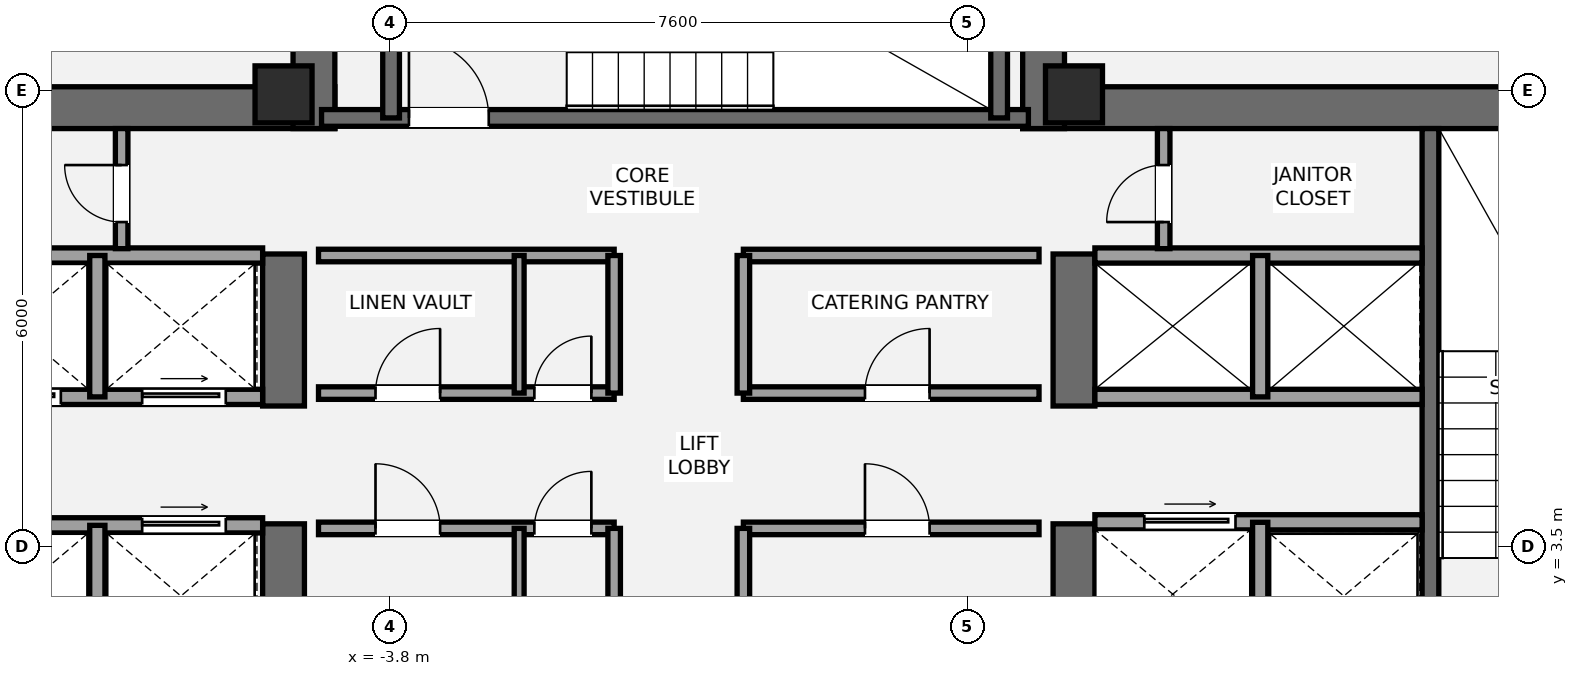
"""IFC4 building model, lengths in metres.
Left out: names, types, materials, properties, quantities, classifications, styles, units other than length and angle.
Written with IfcOpenShell. Run it as: python <this file> out.ifc"""

import sys

from ifc_helpers import new_model, si_unit, direction, frame, frame_2d, origin, origin_2d, place, context, subcontext, project, spatial, rectangle, extrude, element, fill, save


model = new_model("IFC4")
c1 = context("Model", 3, precision=1e-05, world=origin(), true_north=direction((0.0, 1.0)))
c2 = subcontext(c1, "Body", "Model", "MODEL_VIEW")
j1 = project(units=[si_unit("LENGTHUNIT", "METRE"), si_unit("PLANEANGLEUNIT", "RADIAN")], contexts=[c1])
p1 = place(None, origin())
s1 = spatial("IfcSite", under=j1, at=p1, CompositionType="ELEMENT")
p2 = place(p1, origin())
s2 = spatial("IfcBuilding", under=s1, at=p2, CompositionType="ELEMENT")
p3 = place(p2, frame((0.0, 0.0, 213.15)))
s3 = spatial("IfcBuildingStorey", under=s2, at=p3, CompositionType="ELEMENT", Elevation=213.15)
p4 = place(p3, frame((-13.7, 9.275, 0.0), z_axis=(0.0, 0.0, 1.0), x_axis=(1.0, 0.0, 0.0)))
e1 = element("IfcWall", 1, at=p4, inside=s3, PredefinedType="SHEAR", context=c2, shape_type="SweptSolid", body=[
    extrude(rectangle(XDim=9.175, YDim=0.55, at=frame_2d((4.587, 0.0))), origin(), (0.0, 0.0, 1.0), 3.15),
])
p5 = place(p3, frame((-5.2, 1.3, 0.0), z_axis=(0.0, 0.0, 1.0), x_axis=(0.0, 1.0, 0.0)))
e2 = element("IfcWall", 2, at=p5, inside=s3, PredefinedType="SHEAR", context=c2, shape_type="SweptSolid", body=[
    extrude(rectangle(XDim=2.5, YDim=0.55, at=frame_2d((1.25, 0.0))), origin(), (0.0, 0.0, 1.0), 3.15),
])
p6 = place(p3, frame((-5.2, 5.35, 0.0), z_axis=(0.0, 0.0, 1.0), x_axis=(0.0, 1.0, 0.0)))
e3 = element("IfcWall", 3, at=p6, inside=s3, PredefinedType="SHEAR", context=c2, shape_type="SweptSolid", body=[
    extrude(rectangle(XDim=2.0, YDim=0.55, at=frame_2d((1.0, 0.0))), origin(), (0.0, 0.0, 1.0), 3.15),
])
p7 = place(p3, frame((4.525, 9.275, 0.0), z_axis=(0.0, 0.0, 1.0), x_axis=(1.0, 0.0, 0.0)))
e4 = element("IfcWall", 4, at=p7, inside=s3, PredefinedType="SHEAR", context=c2, shape_type="SweptSolid", body=[
    extrude(rectangle(XDim=9.175, YDim=0.55, at=frame_2d((4.587, 0.0))), origin(), (0.0, 0.0, 1.0), 3.15),
])
p8 = place(p3, frame((5.2, 1.3, 0.0), z_axis=(0.0, 0.0, 1.0), x_axis=(0.0, 1.0, 0.0)))
e5 = element("IfcWall", 5, at=p8, inside=s3, PredefinedType="SHEAR", context=c2, shape_type="SweptSolid", body=[
    extrude(rectangle(XDim=2.5, YDim=0.55, at=frame_2d((1.25, 0.0))), origin(), (0.0, 0.0, 1.0), 3.15),
])
p9 = place(p3, frame((5.2, 5.35, 0.0), z_axis=(0.0, 0.0, 1.0), x_axis=(0.0, 1.0, 0.0)))
e6 = element("IfcWall", 6, at=p9, inside=s3, PredefinedType="SHEAR", context=c2, shape_type="SweptSolid", body=[
    extrude(rectangle(XDim=2.0, YDim=0.55, at=frame_2d((1.0, 0.0))), origin(), (0.0, 0.0, 1.0), 3.15),
])
p10 = place(p3, frame((9.89, 1.85, 0.0), z_axis=(0.0, 0.0, 1.0), x_axis=(0.0, 1.0, 0.0)))
e7 = element("IfcWall", 7, at=p10, inside=s3, PredefinedType="SHEAR", context=c2, shape_type="SweptSolid", body=[
    extrude(rectangle(XDim=7.15, YDim=0.22, at=frame_2d((3.575, 0.0))), origin(), (0.0, 0.0, 1.0), 3.15),
])
for number, where, z_axis, x_axis in (
    (8, (-4.8, 9.0, 0.0), (0.0, 0.0, 1.0), (0.0, 1.0, 0.0)),
    (9, (4.8, 9.0, 0.0), (0.0, 0.0, 1.0), (0.0, 1.0, 0.0)),
):
    element("IfcWall", number, at=place(p3, frame(where, z_axis=z_axis, x_axis=x_axis)), inside=s3, PredefinedType="SHEAR", context=c2, shape_type="SweptSolid", body=[
        extrude(rectangle(XDim=3.95, YDim=0.55, at=frame_2d((1.975, 0.0))), origin(), (0.0, 0.0, 1.0), 3.15),
    ])
p11 = place(p3, frame((-4.7, 9.14, 0.0), z_axis=(0.0, 0.0, 1.0), x_axis=(1.0, 0.0, 0.0)))
e10 = element("IfcWall", 10, at=p11, inside=s3, PredefinedType="SHEAR", context=c2, shape_type="SweptSolid", body=[
    extrude(rectangle(XDim=9.3, YDim=0.22, at=frame_2d((4.65, 0.0))), origin(), (0.0, 0.0, 1.0), 3.15),
])
p12 = place(p11, frame((1.15, 0.0, 0.0)))
e11 = element("IfcOpeningElement", 11, at=p12, cuts=e10, PredefinedType="OPENING", context=c2, shape_type="SweptSolid", body=[
    extrude(rectangle(XDim=1.05, YDim=2.15, at=frame_2d((0.525, 1.075))), frame((0.0, 0.12, 0.0), z_axis=(0.0, -1.0, 0.0), x_axis=(1.0, 0.0, 0.0)), (0.0, 0.0, 1.0), 0.24),
])
for number, where, z_axis, x_axis in (
    (12, (-3.785, 9.14, 0.0), (0.0, 0.0, 1.0), (0.0, 1.0, 0.0)),
    (13, (4.215, 9.14, 0.0), (0.0, 0.0, 1.0), (0.0, 1.0, 0.0)),
):
    element("IfcWall", number, at=place(p3, frame(where, z_axis=z_axis, x_axis=x_axis)), inside=s3, PredefinedType="SHEAR", context=c2, shape_type="SweptSolid", body=[
        extrude(rectangle(XDim=3.26, YDim=0.22, at=frame_2d((1.63, 0.0))), origin(), (0.0, 0.0, 1.0), 3.15),
    ])
for number, where, z_axis, x_axis in (
    (14, (-5.2, 9.45, 0.0), (0.0, 0.0, 1.0), (1.0, 0.0, 0.0)),
    (15, (5.2, 9.45, 0.0), (0.0, 0.0, 1.0), (1.0, 0.0, 0.0)),
):
    element("IfcColumn", number, at=place(p3, frame(where, z_axis=z_axis, x_axis=x_axis)), inside=s3, PredefinedType="PILASTER", context=c2, shape_type="SweptSolid", body=[
        extrude(rectangle(XDim=0.75, YDim=0.75, at=origin_2d()), origin(), (0.0, 0.0, 1.0), 3.15),
    ])
p13 = place(p3, frame((-9.78, 3.78, 0.0), z_axis=(0.0, 0.0, 1.0), x_axis=(1.0, 0.0, 0.0)))
e16 = element("IfcWall", 16, at=p13, inside=s3, PredefinedType="SOLIDWALL", context=c2, shape_type="SweptSolid", body=[
    extrude(rectangle(XDim=4.305, YDim=0.2, at=frame_2d((2.152, 0.0))), origin(), (0.0, 0.0, 1.0), 2.97),
])
p14 = place(p13, frame((2.72, 0.0, 0.0)))
e17 = element("IfcOpeningElement", 17, at=p14, cuts=e16, PredefinedType="OPENING", context=c2, shape_type="SweptSolid", body=[
    extrude(rectangle(XDim=1.1, YDim=2.2, at=frame_2d((0.55, 1.1))), frame((0.0, 0.11, 0.0), z_axis=(0.0, -1.0, 0.0), x_axis=(1.0, 0.0, 0.0)), (0.0, 0.0, 1.0), 0.22),
])
p15 = place(p3, frame((-7.65, 1.85, 0.0), z_axis=(0.0, 0.0, 1.0), x_axis=(0.0, 1.0, 0.0)))
e18 = element("IfcWall", 18, at=p15, inside=s3, PredefinedType="SOLIDWALL", context=c2, shape_type="SweptSolid", body=[
    extrude(rectangle(XDim=1.93, YDim=0.2, at=frame_2d((0.965, 0.0))), origin(), (0.0, 0.0, 1.0), 2.97),
])
p16 = place(p3, frame((-9.78, 5.47, 0.0), z_axis=(0.0, 0.0, 1.0), x_axis=(1.0, 0.0, 0.0)))
e19 = element("IfcWall", 19, at=p16, inside=s3, PredefinedType="SOLIDWALL", context=c2, shape_type="SweptSolid", body=[
    extrude(rectangle(XDim=4.305, YDim=0.2, at=frame_2d((2.152, 0.0))), origin(), (0.0, 0.0, 1.0), 2.97),
])
p17 = place(p16, frame((0.55, 0.0, 0.0)))
e20 = element("IfcOpeningElement", 20, at=p17, cuts=e19, PredefinedType="OPENING", context=c2, shape_type="SweptSolid", body=[
    extrude(rectangle(XDim=1.1, YDim=2.2, at=frame_2d((0.55, 1.1))), frame((0.0, 0.11, 0.0), z_axis=(0.0, -1.0, 0.0), x_axis=(1.0, 0.0, 0.0)), (0.0, 0.0, 1.0), 0.22),
])
p18 = place(p16, frame((2.72, 0.0, 0.0)))
e21 = element("IfcOpeningElement", 21, at=p18, cuts=e19, PredefinedType="OPENING", context=c2, shape_type="SweptSolid", body=[
    extrude(rectangle(XDim=1.1, YDim=2.2, at=frame_2d((0.55, 1.1))), frame((0.0, 0.11, 0.0), z_axis=(0.0, -1.0, 0.0), x_axis=(1.0, 0.0, 0.0)), (0.0, 0.0, 1.0), 0.22),
])
p19 = place(p3, frame((-9.78, 7.33, 0.0), z_axis=(0.0, 0.0, 1.0), x_axis=(1.0, 0.0, 0.0)))
e22 = element("IfcWall", 22, at=p19, inside=s3, PredefinedType="SOLIDWALL", context=c2, shape_type="SweptSolid", body=[
    extrude(rectangle(XDim=4.305, YDim=0.2, at=frame_2d((2.152, 0.0))), origin(), (0.0, 0.0, 1.0), 2.97),
])
p20 = place(p3, frame((-7.65, 5.47, 0.0), z_axis=(0.0, 0.0, 1.0), x_axis=(0.0, 1.0, 0.0)))
e23 = element("IfcWall", 23, at=p20, inside=s3, PredefinedType="SOLIDWALL", context=c2, shape_type="SweptSolid", body=[
    extrude(rectangle(XDim=1.86, YDim=0.2, at=frame_2d((0.93, 0.0))), origin(), (0.0, 0.0, 1.0), 2.97),
])
p21 = place(p3, frame((5.475, 3.82, 0.0), z_axis=(0.0, 0.0, 1.0), x_axis=(1.0, 0.0, 0.0)))
e24 = element("IfcWall", 24, at=p21, inside=s3, PredefinedType="SOLIDWALL", context=c2, shape_type="SweptSolid", body=[
    extrude(rectangle(XDim=4.305, YDim=0.2, at=frame_2d((2.152, 0.0))), origin(), (0.0, 0.0, 1.0), 2.97),
])
p22 = place(p21, frame((0.65, 0.0, 0.0)))
e25 = element("IfcOpeningElement", 25, at=p22, cuts=e24, PredefinedType="OPENING", context=c2, shape_type="SweptSolid", body=[
    extrude(rectangle(XDim=1.2, YDim=2.2, at=frame_2d((0.6, 1.1))), frame((0.0, 0.11, 0.0), z_axis=(0.0, -1.0, 0.0), x_axis=(1.0, 0.0, 0.0)), (0.0, 0.0, 1.0), 0.22),
])
p23 = place(p3, frame((7.65, 1.85, 0.0), z_axis=(0.0, 0.0, 1.0), x_axis=(0.0, 1.0, 0.0)))
e26 = element("IfcWall", 26, at=p23, inside=s3, PredefinedType="SOLIDWALL", context=c2, shape_type="SweptSolid", body=[
    extrude(rectangle(XDim=1.97, YDim=0.2, at=frame_2d((0.985, 0.0))), origin(), (0.0, 0.0, 1.0), 2.97),
])
for number, where, z_axis, x_axis in (
    (27, (5.475, 5.47, 0.0), (0.0, 0.0, 1.0), (1.0, 0.0, 0.0)),
    (28, (5.475, 7.33, 0.0), (0.0, 0.0, 1.0), (1.0, 0.0, 0.0)),
):
    element("IfcWall", number, at=place(p3, frame(where, z_axis=z_axis, x_axis=x_axis)), inside=s3, PredefinedType="SOLIDWALL", context=c2, shape_type="SweptSolid", body=[
        extrude(rectangle(XDim=4.305, YDim=0.2, at=frame_2d((2.152, 0.0))), origin(), (0.0, 0.0, 1.0), 2.97),
    ])
p24 = place(p3, frame((7.65, 5.47, 0.0), z_axis=(0.0, 0.0, 1.0), x_axis=(0.0, 1.0, 0.0)))
e29 = element("IfcWall", 29, at=p24, inside=s3, PredefinedType="SOLIDWALL", context=c2, shape_type="SweptSolid", body=[
    extrude(rectangle(XDim=1.86, YDim=0.2, at=frame_2d((0.93, 0.0))), origin(), (0.0, 0.0, 1.0), 2.97),
])
p25 = place(p3, frame((-4.74, 3.74, 0.0), z_axis=(0.0, 0.0, 1.0), x_axis=(1.0, 0.0, 0.0)))
e30 = element("IfcWall", 30, at=p25, inside=s3, PredefinedType="PARTITIONING", context=c2, shape_type="SweptSolid", body=[
    extrude(rectangle(XDim=3.89, YDim=0.165, at=frame_2d((1.945, 0.0))), origin(), (0.0, 0.0, 1.0), 2.97),
])
p26 = place(p25, frame((0.75, 0.0, 0.0)))
e31 = element("IfcOpeningElement", 31, at=p26, cuts=e30, PredefinedType="OPENING", context=c2, shape_type="SweptSolid", body=[
    extrude(rectangle(XDim=0.85, YDim=2.1, at=frame_2d((0.425, 1.05))), frame((0.0, 0.093, 0.0), z_axis=(0.0, -1.0, 0.0), x_axis=(1.0, 0.0, 0.0)), (0.0, 0.0, 1.0), 0.185),
])
p27 = place(p25, frame((2.84, 0.0, 0.0)))
e32 = element("IfcOpeningElement", 32, at=p27, cuts=e30, PredefinedType="OPENING", context=c2, shape_type="SweptSolid", body=[
    extrude(rectangle(XDim=0.75, YDim=2.1, at=frame_2d((0.375, 1.05))), frame((0.0, 0.093, 0.0), z_axis=(0.0, -1.0, 0.0), x_axis=(1.0, 0.0, 0.0)), (0.0, 0.0, 1.0), 0.185),
])
p28 = place(p3, frame((-0.85, 1.92, 0.0), z_axis=(0.0, 0.0, 1.0), x_axis=(0.0, 1.0, 0.0)))
e33 = element("IfcWall", 33, at=p28, inside=s3, PredefinedType="PARTITIONING", context=c2, shape_type="SweptSolid", body=[
    extrude(rectangle(XDim=1.82, YDim=0.165, at=frame_2d((0.91, 0.0))), origin(), (0.0, 0.0, 1.0), 2.97),
])
p29 = place(p3, frame((0.85, 3.74, 0.0), z_axis=(0.0, 0.0, 1.0), x_axis=(1.0, 0.0, 0.0)))
e34 = element("IfcWall", 34, at=p29, inside=s3, PredefinedType="PARTITIONING", context=c2, shape_type="SweptSolid", body=[
    extrude(rectangle(XDim=3.89, YDim=0.165, at=frame_2d((1.945, 0.0))), origin(), (0.0, 0.0, 1.0), 2.97),
])
p30 = place(p29, frame((1.6, 0.0, 0.0)))
e35 = element("IfcOpeningElement", 35, at=p30, cuts=e34, PredefinedType="OPENING", context=c2, shape_type="SweptSolid", body=[
    extrude(rectangle(XDim=0.85, YDim=2.1, at=frame_2d((0.425, 1.05))), frame((0.0, 0.093, 0.0), z_axis=(0.0, -1.0, 0.0), x_axis=(1.0, 0.0, 0.0)), (0.0, 0.0, 1.0), 0.185),
])
p31 = place(p3, frame((0.85, 1.92, 0.0), z_axis=(0.0, 0.0, 1.0), x_axis=(0.0, 1.0, 0.0)))
e36 = element("IfcWall", 36, at=p31, inside=s3, PredefinedType="PARTITIONING", context=c2, shape_type="SweptSolid", body=[
    extrude(rectangle(XDim=1.82, YDim=0.165, at=frame_2d((0.91, 0.0))), origin(), (0.0, 0.0, 1.0), 2.97),
])
p32 = place(p3, frame((-2.1, 1.92, 0.0), z_axis=(0.0, 0.0, 1.0), x_axis=(0.0, 1.0, 0.0)))
e37 = element("IfcWall", 37, at=p32, inside=s3, PredefinedType="PARTITIONING", context=c2, shape_type="SweptSolid", body=[
    extrude(rectangle(XDim=1.82, YDim=0.13, at=frame_2d((0.91, 0.0))), origin(), (0.0, 0.0, 1.0), 2.97),
])
p33 = place(p3, frame((-4.74, 5.52, 0.0), z_axis=(0.0, 0.0, 1.0), x_axis=(1.0, 0.0, 0.0)))
e38 = element("IfcWall", 38, at=p33, inside=s3, PredefinedType="PARTITIONING", context=c2, shape_type="SweptSolid", body=[
    extrude(rectangle(XDim=3.89, YDim=0.165, at=frame_2d((1.945, 0.0))), origin(), (0.0, 0.0, 1.0), 2.97),
])
p34 = place(p33, frame((0.75, 0.0, 0.0)))
e39 = element("IfcOpeningElement", 39, at=p34, cuts=e38, PredefinedType="OPENING", context=c2, shape_type="SweptSolid", body=[
    extrude(rectangle(XDim=0.85, YDim=2.1, at=frame_2d((0.425, 1.05))), frame((0.0, 0.093, 0.0), z_axis=(0.0, -1.0, 0.0), x_axis=(1.0, 0.0, 0.0)), (0.0, 0.0, 1.0), 0.185),
])
p35 = place(p33, frame((2.84, 0.0, 0.0)))
e40 = element("IfcOpeningElement", 40, at=p35, cuts=e38, PredefinedType="OPENING", context=c2, shape_type="SweptSolid", body=[
    extrude(rectangle(XDim=0.75, YDim=2.1, at=frame_2d((0.375, 1.05))), frame((0.0, 0.093, 0.0), z_axis=(0.0, -1.0, 0.0), x_axis=(1.0, 0.0, 0.0)), (0.0, 0.0, 1.0), 0.185),
])
p36 = place(p3, frame((-4.74, 7.33, 0.0), z_axis=(0.0, 0.0, 1.0), x_axis=(1.0, 0.0, 0.0)))
e41 = element("IfcWall", 41, at=p36, inside=s3, PredefinedType="PARTITIONING", context=c2, shape_type="SweptSolid", body=[
    extrude(rectangle(XDim=3.89, YDim=0.165, at=frame_2d((1.945, 0.0))), origin(), (0.0, 0.0, 1.0), 2.97),
])
p37 = place(p3, frame((-0.85, 5.52, 0.0), z_axis=(0.0, 0.0, 1.0), x_axis=(0.0, 1.0, 0.0)))
e42 = element("IfcWall", 42, at=p37, inside=s3, PredefinedType="PARTITIONING", context=c2, shape_type="SweptSolid", body=[
    extrude(rectangle(XDim=1.81, YDim=0.165, at=frame_2d((0.905, 0.0))), origin(), (0.0, 0.0, 1.0), 2.97),
])
p38 = place(p3, frame((0.85, 5.52, 0.0), z_axis=(0.0, 0.0, 1.0), x_axis=(1.0, 0.0, 0.0)))
e43 = element("IfcWall", 43, at=p38, inside=s3, PredefinedType="PARTITIONING", context=c2, shape_type="SweptSolid", body=[
    extrude(rectangle(XDim=3.89, YDim=0.165, at=frame_2d((1.945, 0.0))), origin(), (0.0, 0.0, 1.0), 2.97),
])
p39 = place(p38, frame((1.6, 0.0, 0.0)))
e44 = element("IfcOpeningElement", 44, at=p39, cuts=e43, PredefinedType="OPENING", context=c2, shape_type="SweptSolid", body=[
    extrude(rectangle(XDim=0.85, YDim=2.1, at=frame_2d((0.425, 1.05))), frame((0.0, 0.093, 0.0), z_axis=(0.0, -1.0, 0.0), x_axis=(1.0, 0.0, 0.0)), (0.0, 0.0, 1.0), 0.185),
])
p40 = place(p3, frame((0.85, 7.33, 0.0), z_axis=(0.0, 0.0, 1.0), x_axis=(1.0, 0.0, 0.0)))
e45 = element("IfcWall", 45, at=p40, inside=s3, PredefinedType="PARTITIONING", context=c2, shape_type="SweptSolid", body=[
    extrude(rectangle(XDim=3.89, YDim=0.165, at=frame_2d((1.945, 0.0))), origin(), (0.0, 0.0, 1.0), 2.97),
])
p41 = place(p3, frame((0.85, 5.52, 0.0), z_axis=(0.0, 0.0, 1.0), x_axis=(0.0, 1.0, 0.0)))
e46 = element("IfcWall", 46, at=p41, inside=s3, PredefinedType="PARTITIONING", context=c2, shape_type="SweptSolid", body=[
    extrude(rectangle(XDim=1.81, YDim=0.165, at=frame_2d((0.905, 0.0))), origin(), (0.0, 0.0, 1.0), 2.97),
])
p42 = place(p3, frame((-2.1, 5.52, 0.0), z_axis=(0.0, 0.0, 1.0), x_axis=(0.0, 1.0, 0.0)))
e47 = element("IfcWall", 47, at=p42, inside=s3, PredefinedType="PARTITIONING", context=c2, shape_type="SweptSolid", body=[
    extrude(rectangle(XDim=1.81, YDim=0.13, at=frame_2d((0.905, 0.0))), origin(), (0.0, 0.0, 1.0), 2.97),
])
p43 = place(p3, frame((-7.33, 7.42, 0.0), z_axis=(0.0, 0.0, 1.0), x_axis=(0.0, 1.0, 0.0)))
e48 = element("IfcWall", 48, at=p43, inside=s3, PredefinedType="PARTITIONING", context=c2, shape_type="SweptSolid", body=[
    extrude(rectangle(XDim=1.58, YDim=0.165, at=frame_2d((0.79, 0.0))), origin(), (0.0, 0.0, 1.0), 2.97),
])
p44 = place(p43, frame((0.35, 0.0, 0.0)))
e49 = element("IfcOpeningElement", 49, at=p44, cuts=e48, PredefinedType="OPENING", context=c2, shape_type="SweptSolid", body=[
    extrude(rectangle(XDim=0.75, YDim=2.1, at=frame_2d((0.375, 1.05))), frame((0.0, 0.093, 0.0), z_axis=(0.0, -1.0, 0.0), x_axis=(1.0, 0.0, 0.0)), (0.0, 0.0, 1.0), 0.185),
])
p45 = place(p3, frame((6.38, 7.42, 0.0), z_axis=(0.0, 0.0, 1.0), x_axis=(0.0, 1.0, 0.0)))
e50 = element("IfcWall", 50, at=p45, inside=s3, PredefinedType="PARTITIONING", context=c2, shape_type="SweptSolid", body=[
    extrude(rectangle(XDim=1.58, YDim=0.165, at=frame_2d((0.79, 0.0))), origin(), (0.0, 0.0, 1.0), 2.97),
])
p46 = place(p45, frame((0.35, 0.0, 0.0)))
e51 = element("IfcOpeningElement", 51, at=p46, cuts=e50, PredefinedType="OPENING", context=c2, shape_type="SweptSolid", body=[
    extrude(rectangle(XDim=0.75, YDim=2.1, at=frame_2d((0.375, 1.05))), frame((0.0, 0.093, 0.0), z_axis=(0.0, -1.0, 0.0), x_axis=(1.0, 0.0, 0.0)), (0.0, 0.0, 1.0), 0.185),
])
p47 = place(p12, origin())
e52 = element("IfcDoor", 52, at=p47, inside=s3, OperationType="SINGLE_SWING_LEFT", PredefinedType="DOOR", context=c2, shape_type="SweptSolid", body=[
    extrude(rectangle(XDim=1.05, YDim=2.15, at=frame_2d((0.525, 1.075))), frame((0.0, 0.025, 0.0), z_axis=(0.0, -1.0, 0.0), x_axis=(1.0, 0.0, 0.0)), (0.0, 0.0, 1.0), 0.05),
])
fill(e11, e52)
p48 = place(p17, origin())
e53 = element("IfcDoor", 53, at=p48, inside=s3, OperationType="SLIDING_TO_LEFT", PredefinedType="DOOR", context=c2, shape_type="SweptSolid", body=[
    extrude(rectangle(XDim=1.1, YDim=2.2, at=frame_2d((0.55, 1.1))), frame((0.0, 0.025, 0.0), z_axis=(0.0, -1.0, 0.0), x_axis=(1.0, 0.0, 0.0)), (0.0, 0.0, 1.0), 0.05),
])
fill(e20, e53)
p49 = place(p18, origin())
e54 = element("IfcDoor", 54, at=p49, inside=s3, OperationType="SLIDING_TO_LEFT", PredefinedType="DOOR", context=c2, shape_type="SweptSolid", body=[
    extrude(rectangle(XDim=1.1, YDim=2.2, at=frame_2d((0.55, 1.1))), frame((0.0, 0.025, 0.0), z_axis=(0.0, -1.0, 0.0), x_axis=(1.0, 0.0, 0.0)), (0.0, 0.0, 1.0), 0.05),
])
fill(e21, e54)
p50 = place(p14, origin())
e55 = element("IfcDoor", 55, at=p50, inside=s3, OperationType="SLIDING_TO_LEFT", PredefinedType="DOOR", context=c2, shape_type="SweptSolid", body=[
    extrude(rectangle(XDim=1.1, YDim=2.2, at=frame_2d((0.55, 1.1))), frame((0.0, 0.025, 0.0), z_axis=(0.0, -1.0, 0.0), x_axis=(1.0, 0.0, 0.0)), (0.0, 0.0, 1.0), 0.05),
])
fill(e17, e55)
p51 = place(p22, origin())
e56 = element("IfcDoor", 56, at=p51, inside=s3, OperationType="SLIDING_TO_RIGHT", PredefinedType="DOOR", context=c2, shape_type="SweptSolid", body=[
    extrude(rectangle(XDim=1.2, YDim=2.2, at=frame_2d((0.6, 1.1))), frame((0.0, 0.025, 0.0), z_axis=(0.0, -1.0, 0.0), x_axis=(1.0, 0.0, 0.0)), (0.0, 0.0, 1.0), 0.05),
])
fill(e25, e56)
p52 = place(p26, origin())
e57 = element("IfcDoor", 57, at=p52, inside=s3, OperationType="SINGLE_SWING_LEFT", PredefinedType="DOOR", context=c2, shape_type="SweptSolid", body=[
    extrude(rectangle(XDim=0.85, YDim=2.1, at=frame_2d((0.425, 1.05))), frame((0.0, 0.025, 0.0), z_axis=(0.0, -1.0, 0.0), x_axis=(1.0, 0.0, 0.0)), (0.0, 0.0, 1.0), 0.05),
])
fill(e31, e57)
p53 = place(p27, origin())
e58 = element("IfcDoor", 58, at=p53, inside=s3, OperationType="SINGLE_SWING_RIGHT", PredefinedType="DOOR", context=c2, shape_type="SweptSolid", body=[
    extrude(rectangle(XDim=0.75, YDim=2.1, at=frame_2d((0.375, 1.05))), frame((0.0, 0.025, 0.0), z_axis=(0.0, -1.0, 0.0), x_axis=(1.0, 0.0, 0.0)), (0.0, 0.0, 1.0), 0.05),
])
fill(e32, e58)
p54 = place(p30, origin())
e59 = element("IfcDoor", 59, at=p54, inside=s3, OperationType="SINGLE_SWING_LEFT", PredefinedType="DOOR", context=c2, shape_type="SweptSolid", body=[
    extrude(rectangle(XDim=0.85, YDim=2.1, at=frame_2d((0.425, 1.05))), frame((0.0, 0.025, 0.0), z_axis=(0.0, -1.0, 0.0), x_axis=(1.0, 0.0, 0.0)), (0.0, 0.0, 1.0), 0.05),
])
fill(e35, e59)
p55 = place(p34, origin())
e60 = element("IfcDoor", 60, at=p55, inside=s3, OperationType="SINGLE_SWING_RIGHT", PredefinedType="DOOR", context=c2, shape_type="SweptSolid", body=[
    extrude(rectangle(XDim=0.85, YDim=2.1, at=frame_2d((0.425, 1.05))), frame((0.0, 0.025, 0.0), z_axis=(0.0, -1.0, 0.0), x_axis=(1.0, 0.0, 0.0)), (0.0, 0.0, 1.0), 0.05),
])
fill(e39, e60)
p56 = place(p35, origin())
e61 = element("IfcDoor", 61, at=p56, inside=s3, OperationType="SINGLE_SWING_RIGHT", PredefinedType="DOOR", context=c2, shape_type="SweptSolid", body=[
    extrude(rectangle(XDim=0.75, YDim=2.1, at=frame_2d((0.375, 1.05))), frame((0.0, 0.025, 0.0), z_axis=(0.0, -1.0, 0.0), x_axis=(1.0, 0.0, 0.0)), (0.0, 0.0, 1.0), 0.05),
])
fill(e40, e61)
p57 = place(p39, origin())
e62 = element("IfcDoor", 62, at=p57, inside=s3, OperationType="SINGLE_SWING_RIGHT", PredefinedType="DOOR", context=c2, shape_type="SweptSolid", body=[
    extrude(rectangle(XDim=0.85, YDim=2.1, at=frame_2d((0.425, 1.05))), frame((0.0, 0.025, 0.0), z_axis=(0.0, -1.0, 0.0), x_axis=(1.0, 0.0, 0.0)), (0.0, 0.0, 1.0), 0.05),
])
fill(e44, e62)
p58 = place(p44, origin())
e63 = element("IfcDoor", 63, at=p58, inside=s3, OperationType="SINGLE_SWING_RIGHT", PredefinedType="DOOR", context=c2, shape_type="SweptSolid", body=[
    extrude(rectangle(XDim=0.75, YDim=2.1, at=frame_2d((0.375, 1.05))), frame((0.0, 0.025, 0.0), z_axis=(0.0, -1.0, 0.0), x_axis=(1.0, 0.0, 0.0)), (0.0, 0.0, 1.0), 0.05),
])
fill(e49, e63)
p59 = place(p46, origin())
e64 = element("IfcDoor", 64, at=p59, inside=s3, OperationType="SINGLE_SWING_LEFT", PredefinedType="DOOR", context=c2, shape_type="SweptSolid", body=[
    extrude(rectangle(XDim=0.75, YDim=2.1, at=frame_2d((0.375, 1.05))), frame((0.0, 0.025, 0.0), z_axis=(0.0, -1.0, 0.0), x_axis=(1.0, 0.0, 0.0)), (0.0, 0.0, 1.0), 0.05),
])
fill(e51, e64)
save(model, sys.argv[1])
